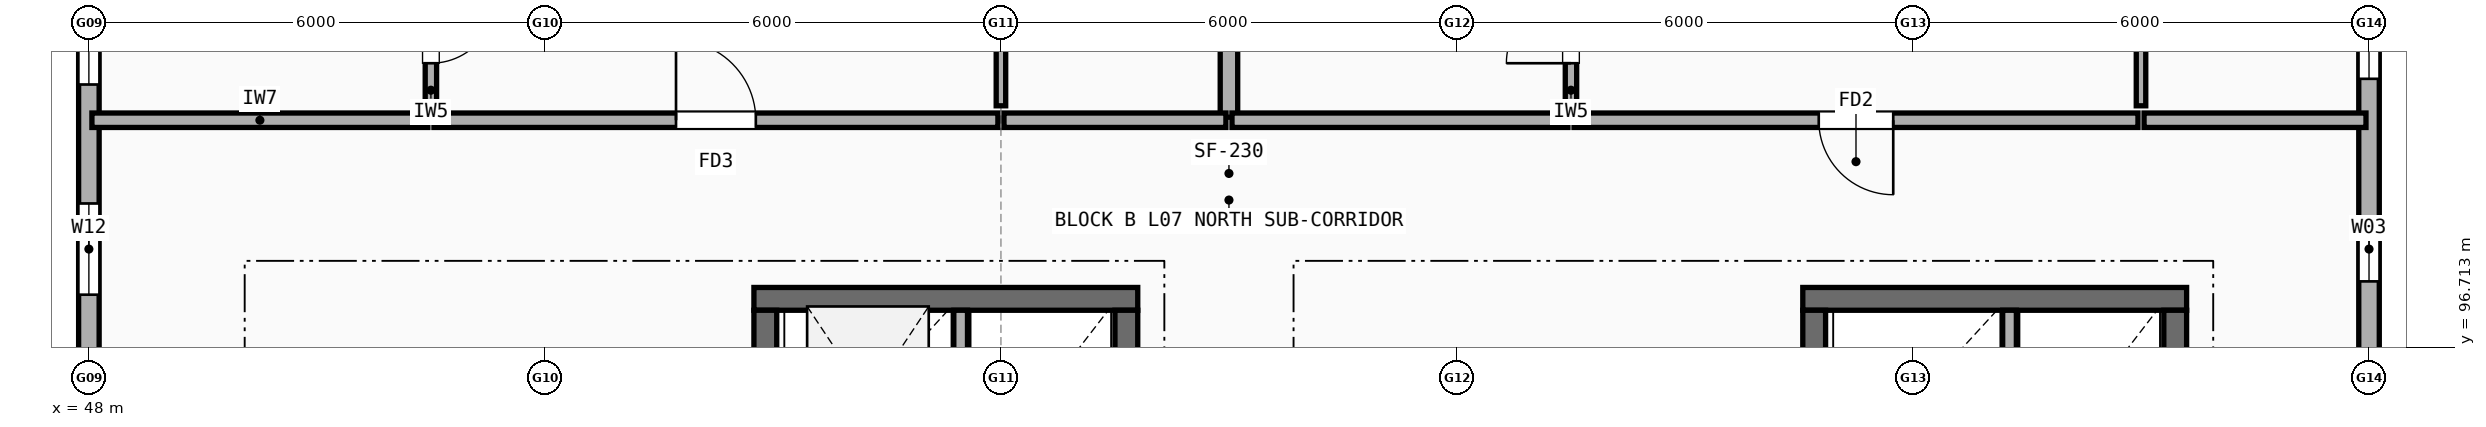
"""IFC4 building model, lengths in metres.
Left out: names, types, materials, properties, quantities, classifications, styles, units other than length and angle.
Written with IfcOpenShell. Run it as: python <this file> out.ifc"""

import sys

from ifc_helpers import new_model, si_unit, direction, frame, frame_2d, origin, place, context, subcontext, project, spatial, rectangle, extrude, element, fill, save


model = new_model("IFC4")
c1 = context("Model", 3, precision=1e-05, world=origin(), true_north=direction((0.0, 1.0)))
c2 = subcontext(c1, "Body", "Model", "MODEL_VIEW")
j1 = project(units=[si_unit("LENGTHUNIT", "METRE"), si_unit("PLANEANGLEUNIT", "RADIAN")], contexts=[c1])
p1 = place(None, origin())
s1 = spatial("IfcSite", under=j1, at=p1, CompositionType="ELEMENT")
p2 = place(p1, origin())
s2 = spatial("IfcBuilding", under=s1, at=p2, CompositionType="ELEMENT")
p3 = place(p2, frame((0.0, 0.0, 23.7)))
s3 = spatial("IfcBuildingStorey", under=s2, at=p3, CompositionType="ELEMENT", Elevation=23.7)
p4 = place(p3, frame((78.0, 96.35, 0.0), z_axis=(0.0, 0.0, 1.0), x_axis=(0.0, 1.0, 0.0)))
e1 = element("IfcWall", 1, at=p4, inside=s3, PredefinedType="STANDARD", context=c2, shape_type="SweptSolid", body=[
    extrude(rectangle(XDim=5.3, YDim=0.27, at=frame_2d((2.65, 0.0))), origin(), (0.0, 0.0, 1.0), 2.457),
])
p5 = place(p4, frame((1.23, 0.0, 0.9)))
e2 = element("IfcOpeningElement", 2, at=p5, cuts=e1, PredefinedType="OPENING", context=c2, shape_type="SweptSolid", body=[
    extrude(rectangle(XDim=0.85, YDim=1.25, at=frame_2d((0.425, 0.625))), frame((0.0, 0.145, 0.0), z_axis=(0.0, -1.0, 0.0), x_axis=(1.0, 0.0, 0.0)), (0.0, 0.0, 1.0), 0.29),
])
p6 = place(p4, frame((3.895, 0.0, 0.9)))
e3 = element("IfcOpeningElement", 3, at=p6, cuts=e1, PredefinedType="OPENING", context=c2, shape_type="SweptSolid", body=[
    extrude(rectangle(XDim=0.9, YDim=1.3, at=frame_2d((0.45, 0.65))), frame((0.0, 0.145, 0.0), z_axis=(0.0, -1.0, 0.0), x_axis=(1.0, 0.0, 0.0)), (0.0, 0.0, 1.0), 0.29),
])
p7 = place(p3, frame((48.0, 101.65, 0.0), z_axis=(0.0, 0.0, 1.0), x_axis=(0.0, -1.0, 0.0)))
e4 = element("IfcWall", 4, at=p7, inside=s3, PredefinedType="STANDARD", context=c2, shape_type="SweptSolid", body=[
    extrude(rectangle(XDim=5.3, YDim=0.27, at=frame_2d((2.65, 0.0))), origin(), (0.0, 0.0, 1.0), 2.457),
])
p8 = place(p7, frame((0.43, 0.0, 0.9)))
e5 = element("IfcOpeningElement", 5, at=p8, cuts=e4, PredefinedType="OPENING", context=c2, shape_type="SweptSolid", body=[
    extrude(rectangle(XDim=1.05, YDim=1.35, at=frame_2d((0.525, 0.675))), frame((0.0, 0.145, 0.0), z_axis=(0.0, -1.0, 0.0), x_axis=(1.0, 0.0, 0.0)), (0.0, 0.0, 1.0), 0.29),
])
p9 = place(p7, frame((3.045, 0.0, 0.9)))
e6 = element("IfcOpeningElement", 6, at=p9, cuts=e4, PredefinedType="OPENING", context=c2, shape_type="SweptSolid", body=[
    extrude(rectangle(XDim=1.2, YDim=1.35, at=frame_2d((0.6, 0.675))), frame((0.0, 0.145, 0.0), z_axis=(0.0, -1.0, 0.0), x_axis=(1.0, 0.0, 0.0)), (0.0, 0.0, 1.0), 0.29),
])
p10 = place(p3, frame((61.8, 97.35, 0.0), z_axis=(0.0, 0.0, 1.0), x_axis=(-1.0, 0.0, 0.0)))
e7 = element("IfcWall", 7, at=p10, inside=s3, PredefinedType="SHEAR", context=c2, shape_type="SweptSolid", body=[
    extrude(rectangle(XDim=5.05, YDim=0.3, at=frame_2d((2.525, 0.0))), origin(), (0.0, 0.0, 1.0), 2.975),
])
p11 = place(p3, frame((61.65, 90.75, 0.0), z_axis=(0.0, 0.0, 1.0), x_axis=(0.0, 1.0, 0.0)))
e8 = element("IfcWall", 8, at=p11, inside=s3, PredefinedType="SHEAR", context=c2, shape_type="SweptSolid", body=[
    extrude(rectangle(XDim=6.45, YDim=0.3, at=frame_2d((3.225, 0.0))), origin(), (0.0, 0.0, 1.0), 2.975),
])
p12 = place(p3, frame((56.9, 93.75, 0.0), z_axis=(0.0, 0.0, 1.0), x_axis=(0.0, 1.0, 0.0)))
e9 = element("IfcWall", 9, at=p12, inside=s3, PredefinedType="SHEAR", context=c2, shape_type="SweptSolid", body=[
    extrude(rectangle(XDim=3.45, YDim=0.3, at=frame_2d((1.725, 0.0))), origin(), (0.0, 0.0, 1.0), 2.975),
])
p13 = place(p3, frame((59.47, 94.94, 0.0), z_axis=(0.0, 0.0, 1.0), x_axis=(0.0, 1.0, 0.0)))
e10 = element("IfcWall", 10, at=p13, inside=s3, PredefinedType="SOLIDWALL", context=c2, shape_type="SweptSolid", body=[
    extrude(rectangle(XDim=2.26, YDim=0.18, at=frame_2d((1.13, 0.0))), origin(), (0.0, 0.0, 1.0), 2.975),
])
p14 = place(p3, frame((75.6, 97.35, 0.0), z_axis=(0.0, 0.0, 1.0), x_axis=(-1.0, 0.0, 0.0)))
e11 = element("IfcWall", 11, at=p14, inside=s3, PredefinedType="SHEAR", context=c2, shape_type="SweptSolid", body=[
    extrude(rectangle(XDim=5.05, YDim=0.3, at=frame_2d((2.525, 0.0))), origin(), (0.0, 0.0, 1.0), 2.975),
])
p15 = place(p3, frame((75.45, 90.75, 0.0), z_axis=(0.0, 0.0, 1.0), x_axis=(0.0, 1.0, 0.0)))
e12 = element("IfcWall", 12, at=p15, inside=s3, PredefinedType="SHEAR", context=c2, shape_type="SweptSolid", body=[
    extrude(rectangle(XDim=6.45, YDim=0.3, at=frame_2d((3.225, 0.0))), origin(), (0.0, 0.0, 1.0), 2.975),
])
p16 = place(p3, frame((70.7, 93.65, 0.0), z_axis=(0.0, 0.0, 1.0), x_axis=(0.0, 1.0, 0.0)))
e13 = element("IfcWall", 13, at=p16, inside=s3, PredefinedType="SHEAR", context=c2, shape_type="SweptSolid", body=[
    extrude(rectangle(XDim=3.55, YDim=0.3, at=frame_2d((1.775, 0.0))), origin(), (0.0, 0.0, 1.0), 2.975),
])
p17 = place(p3, frame((73.27, 94.94, 0.0), z_axis=(0.0, 0.0, 1.0), x_axis=(0.0, 1.0, 0.0)))
e14 = element("IfcWall", 14, at=p17, inside=s3, PredefinedType="SOLIDWALL", context=c2, shape_type="SweptSolid", body=[
    extrude(rectangle(XDim=2.26, YDim=0.18, at=frame_2d((1.13, 0.0))), origin(), (0.0, 0.0, 1.0), 2.975),
])
p18 = place(p3, frame((63.0, 99.74, 0.0), z_axis=(0.0, 0.0, 1.0), x_axis=(0.0, 1.0, 0.0)))
e15 = element("IfcWall", 15, at=p18, inside=s3, PredefinedType="SOLIDWALL", context=c2, shape_type="SweptSolid", body=[
    extrude(rectangle(XDim=13.87, YDim=0.23, at=frame_2d((6.935, 0.0))), origin(), (0.0, 0.0, 1.0), 2.457),
])
p19 = place(p3, frame((48.04, 99.7, 0.0), z_axis=(0.0, 0.0, 1.0), x_axis=(1.0, 0.0, 0.0)))
e16 = element("IfcWall", 16, at=p19, inside=s3, PredefinedType="SOLIDWALL", context=c2, shape_type="SweptSolid", body=[
    extrude(rectangle(XDim=4.42, YDim=0.19, at=frame_2d((2.21, 0.0))), origin(), (0.0, 0.0, 1.0), 2.457),
])
p20 = place(p3, frame((52.54, 99.7, 0.0), z_axis=(0.0, 0.0, 1.0), x_axis=(1.0, 0.0, 0.0)))
e17 = element("IfcWall", 17, at=p20, inside=s3, PredefinedType="SOLIDWALL", context=c2, shape_type="SweptSolid", body=[
    extrude(rectangle(XDim=7.42, YDim=0.19, at=frame_2d((3.71, 0.0))), origin(), (0.0, 0.0, 1.0), 2.508),
])
p21 = place(p20, frame((3.185, 0.0, 0.0)))
e18 = element("IfcOpeningElement", 18, at=p21, cuts=e17, PredefinedType="OPENING", context=c2, shape_type="SweptSolid", body=[
    extrude(rectangle(XDim=1.05, YDim=2.15, at=frame_2d((0.525, 1.075))), frame((0.0, 0.105, 0.0), z_axis=(0.0, -1.0, 0.0), x_axis=(1.0, 0.0, 0.0)), (0.0, 0.0, 1.0), 0.21),
])
p22 = place(p3, frame((52.5, 99.89, 0.0), z_axis=(0.0, 0.0, 1.0), x_axis=(0.0, 1.0, 0.0)))
e19 = element("IfcWall", 19, at=p22, inside=s3, PredefinedType="PARTITIONING", context=c2, shape_type="SweptSolid", body=[
    extrude(rectangle(XDim=1.97, YDim=0.15, at=frame_2d((0.985, 0.0))), origin(), (0.0, 0.0, 1.0), 2.975),
])
p23 = place(p22, frame((0.56, 0.0, 0.0)))
e20 = element("IfcOpeningElement", 20, at=p23, cuts=e19, PredefinedType="OPENING", context=c2, shape_type="SweptSolid", body=[
    extrude(rectangle(XDim=0.85, YDim=2.1, at=frame_2d((0.425, 1.05))), frame((0.0, 0.085, 0.0), z_axis=(0.0, -1.0, 0.0), x_axis=(1.0, 0.0, 0.0)), (0.0, 0.0, 1.0), 0.17),
])
p24 = place(p3, frame((60.04, 99.7, 0.0), z_axis=(0.0, 0.0, 1.0), x_axis=(1.0, 0.0, 0.0)))
e21 = element("IfcWall", 21, at=p24, inside=s3, PredefinedType="SOLIDWALL", context=c2, shape_type="SweptSolid", body=[
    extrude(rectangle(XDim=2.92, YDim=0.19, at=frame_2d((1.46, 0.0))), origin(), (0.0, 0.0, 1.0), 2.508),
])
p25 = place(p3, frame((60.0, 99.89, 0.0), z_axis=(0.0, 0.0, 1.0), x_axis=(0.0, 1.0, 0.0)))
e22 = element("IfcWall", 22, at=p25, inside=s3, PredefinedType="PARTITIONING", context=c2, shape_type="SweptSolid", body=[
    extrude(rectangle(XDim=13.6, YDim=0.125, at=frame_2d((6.8, 0.0))), origin(), (0.0, 0.0, 1.0), 2.458),
])
p26 = place(p25, frame((6.65, 0.0, 0.0)))
e23 = element("IfcOpeningElement", 23, at=p26, cuts=e22, PredefinedType="OPENING", context=c2, shape_type="SweptSolid", body=[
    extrude(rectangle(XDim=0.88, YDim=2.1, at=frame_2d((0.44, 1.05))), frame((0.0, 0.073, 0.0), z_axis=(0.0, -1.0, 0.0), x_axis=(1.0, 0.0, 0.0)), (0.0, 0.0, 1.0), 0.145),
])
p27 = place(p3, frame((63.04, 99.7, 0.0), z_axis=(0.0, 0.0, 1.0), x_axis=(1.0, 0.0, 0.0)))
e24 = element("IfcWall", 24, at=p27, inside=s3, PredefinedType="SOLIDWALL", context=c2, shape_type="SweptSolid", body=[
    extrude(rectangle(XDim=4.42, YDim=0.19, at=frame_2d((2.21, 0.0))), origin(), (0.0, 0.0, 1.0), 2.975),
])
p28 = place(p3, frame((67.54, 99.7, 0.0), z_axis=(0.0, 0.0, 1.0), x_axis=(1.0, 0.0, 0.0)))
e25 = element("IfcWall", 25, at=p28, inside=s3, PredefinedType="SOLIDWALL", context=c2, shape_type="SweptSolid", body=[
    extrude(rectangle(XDim=7.42, YDim=0.19, at=frame_2d((3.71, 0.0))), origin(), (0.0, 0.0, 1.0), 2.975),
])
p29 = place(p28, frame((3.22, 0.0, 0.0)))
e26 = element("IfcOpeningElement", 26, at=p29, cuts=e25, PredefinedType="OPENING", context=c2, shape_type="SweptSolid", body=[
    extrude(rectangle(XDim=0.98, YDim=2.15, at=frame_2d((0.49, 1.075))), frame((0.0, 0.105, 0.0), z_axis=(0.0, -1.0, 0.0), x_axis=(1.0, 0.0, 0.0)), (0.0, 0.0, 1.0), 0.21),
])
p30 = place(p3, frame((67.5, 99.89, 0.0), z_axis=(0.0, 0.0, 1.0), x_axis=(0.0, 1.0, 0.0)))
e27 = element("IfcWall", 27, at=p30, inside=s3, PredefinedType="PARTITIONING", context=c2, shape_type="SweptSolid", body=[
    extrude(rectangle(XDim=1.97, YDim=0.15, at=frame_2d((0.985, 0.0))), origin(), (0.0, 0.0, 1.0), 2.975),
])
p31 = place(p30, frame((0.56, 0.0, 0.0)))
e28 = element("IfcOpeningElement", 28, at=p31, cuts=e27, PredefinedType="OPENING", context=c2, shape_type="SweptSolid", body=[
    extrude(rectangle(XDim=0.85, YDim=2.1, at=frame_2d((0.425, 1.05))), frame((0.0, 0.085, 0.0), z_axis=(0.0, -1.0, 0.0), x_axis=(1.0, 0.0, 0.0)), (0.0, 0.0, 1.0), 0.17),
])
p32 = place(p3, frame((75.04, 99.7, 0.0), z_axis=(0.0, 0.0, 1.0), x_axis=(1.0, 0.0, 0.0)))
e29 = element("IfcWall", 29, at=p32, inside=s3, PredefinedType="SOLIDWALL", context=c2, shape_type="SweptSolid", body=[
    extrude(rectangle(XDim=2.92, YDim=0.19, at=frame_2d((1.46, 0.0))), origin(), (0.0, 0.0, 1.0), 2.457),
])
p33 = place(p3, frame((75.0, 99.89, 0.0), z_axis=(0.0, 0.0, 1.0), x_axis=(0.0, 1.0, 0.0)))
e30 = element("IfcWall", 30, at=p33, inside=s3, PredefinedType="PARTITIONING", context=c2, shape_type="SweptSolid", body=[
    extrude(rectangle(XDim=13.92, YDim=0.125, at=frame_2d((6.96, 0.0))), origin(), (0.0, 0.0, 1.0), 2.457),
])
p34 = place(p33, frame((6.65, 0.0, 0.0)))
e31 = element("IfcOpeningElement", 31, at=p34, cuts=e30, PredefinedType="OPENING", context=c2, shape_type="SweptSolid", body=[
    extrude(rectangle(XDim=0.9, YDim=2.1, at=frame_2d((0.45, 1.05))), frame((0.0, 0.073, 0.0), z_axis=(0.0, -1.0, 0.0), x_axis=(1.0, 0.0, 0.0)), (0.0, 0.0, 1.0), 0.145),
])
p35 = place(p5, origin())
e32 = element("IfcWindow", 32, at=p35, inside=s3, PartitioningType="SINGLE_PANEL", PredefinedType="WINDOW", context=c2, shape_type="SweptSolid", body=[
    extrude(rectangle(XDim=0.85, YDim=1.25, at=frame_2d((0.425, 0.625))), frame((0.0, 0.03, 0.0), z_axis=(0.0, -1.0, 0.0), x_axis=(1.0, 0.0, 0.0)), (0.0, 0.0, 1.0), 0.06),
])
fill(e2, e32)
p36 = place(p6, origin())
e33 = element("IfcWindow", 33, at=p36, inside=s3, PartitioningType="SINGLE_PANEL", PredefinedType="WINDOW", context=c2, shape_type="SweptSolid", body=[
    extrude(rectangle(XDim=0.9, YDim=1.3, at=frame_2d((0.45, 0.65))), frame((0.0, 0.03, 0.0), z_axis=(0.0, -1.0, 0.0), x_axis=(1.0, 0.0, 0.0)), (0.0, 0.0, 1.0), 0.06),
])
fill(e3, e33)
p37 = place(p8, origin())
e34 = element("IfcWindow", 34, at=p37, inside=s3, PartitioningType="SINGLE_PANEL", PredefinedType="WINDOW", context=c2, shape_type="SweptSolid", body=[
    extrude(rectangle(XDim=1.05, YDim=1.35, at=frame_2d((0.525, 0.675))), frame((0.0, 0.03, 0.0), z_axis=(0.0, -1.0, 0.0), x_axis=(1.0, 0.0, 0.0)), (0.0, 0.0, 1.0), 0.06),
])
fill(e5, e34)
p38 = place(p9, origin())
e35 = element("IfcWindow", 35, at=p38, inside=s3, PartitioningType="SINGLE_PANEL", PredefinedType="WINDOW", context=c2, shape_type="SweptSolid", body=[
    extrude(rectangle(XDim=1.2, YDim=1.35, at=frame_2d((0.6, 0.675))), frame((0.0, 0.03, 0.0), z_axis=(0.0, -1.0, 0.0), x_axis=(1.0, 0.0, 0.0)), (0.0, 0.0, 1.0), 0.06),
])
fill(e6, e35)
p39 = place(p21, origin())
e36 = element("IfcDoor", 36, at=p39, inside=s3, OperationType="SINGLE_SWING_LEFT", PredefinedType="DOOR", context=c2, shape_type="SweptSolid", body=[
    extrude(rectangle(XDim=1.05, YDim=2.15, at=frame_2d((0.525, 1.075))), frame((0.0, 0.025, 0.0), z_axis=(0.0, -1.0, 0.0), x_axis=(1.0, 0.0, 0.0)), (0.0, 0.0, 1.0), 0.05),
])
fill(e18, e36)
p40 = place(p23, origin())
e37 = element("IfcDoor", 37, at=p40, inside=s3, OperationType="SINGLE_SWING_RIGHT", PredefinedType="DOOR", context=c2, shape_type="SweptSolid", body=[
    extrude(rectangle(XDim=0.85, YDim=2.1, at=frame_2d((0.425, 1.05))), frame((0.0, 0.025, 0.0), z_axis=(0.0, -1.0, 0.0), x_axis=(1.0, 0.0, 0.0)), (0.0, 0.0, 1.0), 0.05),
])
fill(e20, e37)
p41 = place(p29, origin())
e38 = element("IfcDoor", 38, at=p41, inside=s3, OperationType="SINGLE_SWING_RIGHT", PredefinedType="DOOR", context=c2, shape_type="SweptSolid", body=[
    extrude(rectangle(XDim=0.98, YDim=2.15, at=frame_2d((0.49, 1.075))), frame((0.0, 0.025, 0.0), z_axis=(0.0, -1.0, 0.0), x_axis=(1.0, 0.0, 0.0)), (0.0, 0.0, 1.0), 0.05),
])
fill(e26, e38)
p42 = place(p31, origin())
e39 = element("IfcDoor", 39, at=p42, inside=s3, OperationType="SINGLE_SWING_LEFT", PredefinedType="DOOR", context=c2, shape_type="SweptSolid", body=[
    extrude(rectangle(XDim=0.85, YDim=2.1, at=frame_2d((0.425, 1.05))), frame((0.0, 0.025, 0.0), z_axis=(0.0, -1.0, 0.0), x_axis=(1.0, 0.0, 0.0)), (0.0, 0.0, 1.0), 0.05),
])
fill(e28, e39)
save(model, sys.argv[1])
